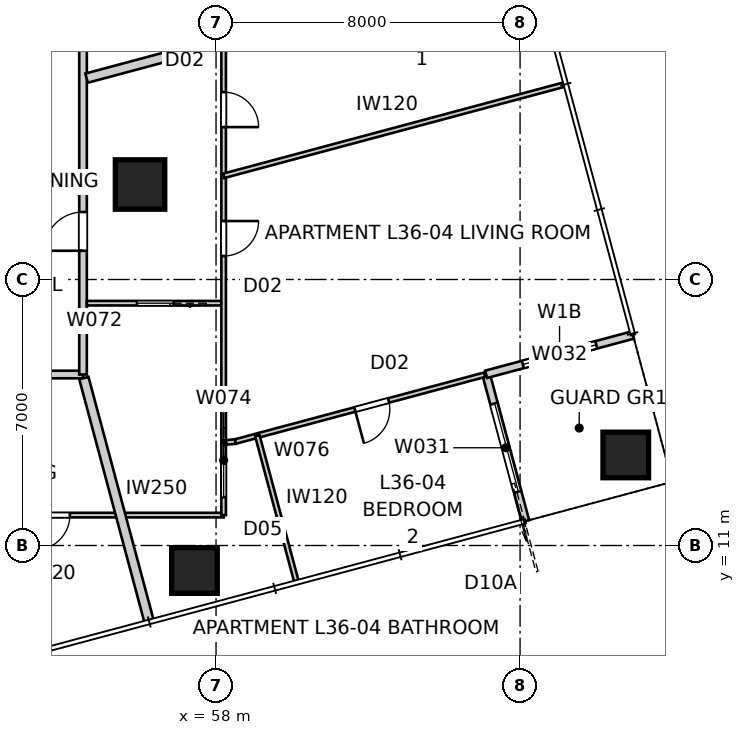
"""IFC4 building model, lengths in metres.
Left out: names, types, materials, properties, quantities, classifications, styles, units other than length and angle.
Written with IfcOpenShell. Run it as: python <this file> out.ifc"""

import sys

from ifc_helpers import new_model, si_unit, direction, frame, frame_2d, origin, origin_2d, place, context, subcontext, project, spatial, rectangle, extrude, element, fill, save


model = new_model("IFC4")
c1 = context("Model", 3, precision=1e-05, world=origin(), true_north=direction((0.0, 1.0)))
c2 = subcontext(c1, "Body", "Model", "MODEL_VIEW")
j1 = project(units=[si_unit("LENGTHUNIT", "METRE"), si_unit("PLANEANGLEUNIT", "RADIAN")], contexts=[c1])
p1 = place(None, origin())
s1 = spatial("IfcSite", under=j1, at=p1, CompositionType="ELEMENT")
p2 = place(p1, origin())
s2 = spatial("IfcBuilding", under=s1, at=p2, CompositionType="ELEMENT")
p3 = place(p2, frame((0.0, 0.0, 132.0)))
s3 = spatial("IfcBuildingStorey", under=s2, at=p3, CompositionType="ELEMENT", Elevation=132.0)
for number, where, z_axis, x_axis in (
    (1, (57.432, 10.342, 0.0), (0.0, 0.0, 1.0), (1.0, 0.0, 0.0)),
    (2, (68.781, 13.383, 0.0), (0.0, 0.0, 1.0), (1.0, 0.0, 0.0)),
):
    element("IfcColumn", number, at=place(p3, frame(where, z_axis=z_axis, x_axis=x_axis)), inside=s3, PredefinedType="COLUMN", context=c2, shape_type="SweptSolid", body=[
        extrude(rectangle(XDim=1.2, YDim=1.2, at=origin_2d()), origin(), (0.0, 0.0, 1.0), 3.4),
    ])
p4 = place(p3, frame((56.0, 20.5, 0.0), z_axis=(0.0, 0.0, 1.0), x_axis=(1.0, 0.0, 0.0)))
e3 = element("IfcColumn", 3, at=p4, inside=s3, PredefinedType="COLUMN", context=c2, shape_type="SweptSolid", body=[
    extrude(rectangle(XDim=1.3, YDim=1.3, at=origin_2d()), origin(), (0.0, 0.0, 1.0), 3.4),
])
p5 = place(p3, frame((66.143, 11.641, 0.0), z_axis=(0.0, 0.0, 1.0), x_axis=(-0.258843877716, 0.965919172068, 0.0)))
e4 = element("IfcWall", 4, at=p5, inside=s3, PredefinedType="SOLIDWALL", context=c2, shape_type="SweptSolid", body=[
    extrude(rectangle(XDim=4.0, YDim=0.2, at=frame_2d((2.0, 0.0))), origin(), (0.0, 0.0, 1.0), 3.25),
])
p6 = place(p5, frame((0.8, 0.0, 0.0)))
e5 = element("IfcOpeningElement", 5, at=p6, cuts=e4, PredefinedType="OPENING", context=c2, shape_type="SweptSolid", body=[
    extrude(rectangle(XDim=2.4, YDim=2.1, at=frame_2d((1.2, 1.05))), frame((0.0, 0.11, 0.0), z_axis=(0.0, -1.0, 0.0), x_axis=(1.0, 0.0, 0.0)), (0.0, 0.0, 1.0), 0.22),
])
p7 = place(p3, frame((65.107, 15.504, 0.0), z_axis=(0.0, 0.0, 1.0), x_axis=(0.965934430412, 0.258786931944, 0.0)))
e6 = element("IfcWall", 6, at=p7, inside=s3, PredefinedType="SOLIDWALL", context=c2, shape_type="SweptSolid", body=[
    extrude(rectangle(XDim=4.0, YDim=0.2, at=frame_2d((2.0, 0.0))), origin(), (0.0, 0.0, 1.0), 3.25),
])
p8 = place(p7, frame((1.0, 0.0, 0.45)))
e7 = element("IfcOpeningElement", 7, at=p8, cuts=e6, PredefinedType="OPENING", context=c2, shape_type="SweptSolid", body=[
    extrude(rectangle(XDim=2.0, YDim=1.8, at=frame_2d((1.0, 0.9))), frame((0.0, 0.11, 0.0), z_axis=(0.0, -1.0, 0.0), x_axis=(1.0, 0.0, 0.0)), (0.0, 0.0, 1.0), 0.22),
])
p9 = place(p3, frame((25.5, 15.5, 0.0), z_axis=(0.0, 0.0, 1.0), x_axis=(1.0, 0.0, 0.0)))
e8 = element("IfcWall", 8, at=p9, inside=s3, PredefinedType="PARTITIONING", context=c2, shape_type="SweptSolid", body=[
    extrude(rectangle(XDim=29.0, YDim=0.2, at=frame_2d((14.5, 0.0))), origin(), (0.0, 0.0, 1.0), 3.25),
])
p10 = place(p9, frame((24.996, 0.0, 0.0)))
e9 = element("IfcOpeningElement", 9, at=p10, cuts=e8, PredefinedType="OPENING", context=c2, shape_type="SweptSolid", body=[
    extrude(rectangle(XDim=1.02, YDim=2.1, at=frame_2d((0.51, 1.05))), frame((0.0, 0.11, 0.0), z_axis=(0.0, -1.0, 0.0), x_axis=(1.0, 0.0, 0.0)), (0.0, 0.0, 1.0), 0.22),
])
p11 = place(p9, frame((1.761, 0.0, 0.0)))
e10 = element("IfcOpeningElement", 10, at=p11, cuts=e8, PredefinedType="OPENING", context=c2, shape_type="SweptSolid", body=[
    extrude(rectangle(XDim=1.02, YDim=2.34, at=frame_2d((0.51, 1.17))), frame((0.0, 0.11, 0.0), z_axis=(0.0, -1.0, 0.0), x_axis=(1.0, 0.0, 0.0)), (0.0, 0.0, 1.0), 0.22),
])
p12 = place(p3, frame((54.5, 15.5, 0.0), z_axis=(0.0, 0.0, 1.0), x_axis=(0.0, 1.0, 0.0)))
e11 = element("IfcWall", 11, at=p12, inside=s3, PredefinedType="PARTITIONING", context=c2, shape_type="SweptSolid", body=[
    extrude(rectangle(XDim=28.2, YDim=0.2, at=frame_2d((14.1, 0.0))), origin(), (0.0, 0.0, 1.0), 3.25),
])
p13 = place(p12, frame((21.527, 0.0, 0.0)))
e12 = element("IfcOpeningElement", 12, at=p13, cuts=e11, PredefinedType="OPENING", context=c2, shape_type="SweptSolid", body=[
    extrude(rectangle(XDim=1.02, YDim=2.34, at=frame_2d((0.51, 1.17))), frame((0.0, 0.11, 0.0), z_axis=(0.0, -1.0, 0.0), x_axis=(1.0, 0.0, 0.0)), (0.0, 0.0, 1.0), 0.22),
])
p14 = place(p12, frame((3.256, 0.0, 0.0)))
e13 = element("IfcOpeningElement", 13, at=p14, cuts=e11, PredefinedType="OPENING", context=c2, shape_type="SweptSolid", body=[
    extrude(rectangle(XDim=1.02, YDim=2.1, at=frame_2d((0.51, 1.05))), frame((0.0, 0.11, 0.0), z_axis=(0.0, -1.0, 0.0), x_axis=(1.0, 0.0, 0.0)), (0.0, 0.0, 1.0), 0.22),
])
p15 = place(p12, frame((26.127, 0.0, 0.0)))
e14 = element("IfcOpeningElement", 14, at=p15, cuts=e11, PredefinedType="OPENING", context=c2, shape_type="SweptSolid", body=[
    extrude(rectangle(XDim=1.02, YDim=2.34, at=frame_2d((0.51, 1.17))), frame((0.0, 0.11, 0.0), z_axis=(0.0, -1.0, 0.0), x_axis=(1.0, 0.0, 0.0)), (0.0, 0.0, 1.0), 0.22),
])
p16 = place(p3, frame((56.242, 8.988, 0.0), z_axis=(0.0, 0.0, 1.0), x_axis=(-0.25880587229, 0.965929355837, 0.0)))
e15 = element("IfcWall", 15, at=p16, inside=s3, PredefinedType="PARTITIONING", context=c2, shape_type="SweptSolid", body=[
    extrude(rectangle(XDim=6.645, YDim=0.25, at=frame_2d((3.322, 0.0))), origin(), (0.0, 0.0, 1.0), 3.25),
])
p17 = place(p3, frame((66.318, 26.44, 0.0), z_axis=(0.0, 0.0, 1.0), x_axis=(-0.965924438766, -0.258824223352, 0.0)))
e16 = element("IfcWall", 16, at=p17, inside=s3, PredefinedType="PARTITIONING", context=c2, shape_type="SweptSolid", body=[
    extrude(rectangle(XDim=12.138, YDim=0.25, at=frame_2d((6.069, 0.0))), origin(), (0.0, 0.0, 1.0), 3.25),
])
p18 = place(p3, frame((58.2, 11.8, 0.0), z_axis=(0.0, 0.0, 1.0), x_axis=(-1.0, 0.0, 0.0)))
e17 = element("IfcWall", 17, at=p18, inside=s3, PredefinedType="PARTITIONING", context=c2, shape_type="SweptSolid", body=[
    extrude(rectangle(XDim=20.9, YDim=0.12, at=frame_2d((10.45, 0.0))), origin(), (0.0, 0.0, 1.0), 3.25),
])
p19 = place(p18, frame((7.807, 0.0, 0.0)))
e18 = element("IfcOpeningElement", 18, at=p19, cuts=e17, PredefinedType="OPENING", context=c2, shape_type="SweptSolid", body=[
    extrude(rectangle(XDim=0.92, YDim=2.34, at=frame_2d((0.46, 1.17))), frame((0.0, 0.07, 0.0), z_axis=(0.0, -1.0, 0.0), x_axis=(1.0, 0.0, 0.0)), (0.0, 0.0, 1.0), 0.14),
])
p20 = place(p18, frame((4.046, 0.0, 0.0)))
e19 = element("IfcOpeningElement", 19, at=p20, cuts=e17, PredefinedType="OPENING", context=c2, shape_type="SweptSolid", body=[
    extrude(rectangle(XDim=0.92, YDim=2.34, at=frame_2d((0.46, 1.17))), frame((0.0, 0.07, 0.0), z_axis=(0.0, -1.0, 0.0), x_axis=(1.0, 0.0, 0.0)), (0.0, 0.0, 1.0), 0.14),
])
p21 = place(p18, frame((15.602, 0.0, 0.0)))
e20 = element("IfcOpeningElement", 20, at=p21, cuts=e17, PredefinedType="OPENING", context=c2, shape_type="SweptSolid", body=[
    extrude(rectangle(XDim=0.96, YDim=2.1, at=frame_2d((0.48, 1.05))), frame((0.0, 0.07, 0.0), z_axis=(0.0, -1.0, 0.0), x_axis=(1.0, 0.0, 0.0)), (0.0, 0.0, 1.0), 0.14),
])
p22 = place(p3, frame((58.2, 17.377, 0.0), z_axis=(0.0, 0.0, 1.0), x_axis=(-1.0, 0.0, 0.0)))
e21 = element("IfcWall", 21, at=p22, inside=s3, PredefinedType="PARTITIONING", context=c2, shape_type="SweptSolid", body=[
    extrude(rectangle(XDim=3.6, YDim=0.12, at=frame_2d((1.8, 0.0))), origin(), (0.0, 0.0, 1.0), 3.25),
])
p23 = place(p22, frame((1.32, 0.0, 0.0)))
e22 = element("IfcOpeningElement", 22, at=p23, cuts=e21, PredefinedType="OPENING", context=c2, shape_type="SweptSolid", body=[
    extrude(rectangle(XDim=0.96, YDim=2.1, at=frame_2d((0.48, 1.05))), frame((0.0, 0.07, 0.0), z_axis=(0.0, -1.0, 0.0), x_axis=(1.0, 0.0, 0.0)), (0.0, 0.0, 1.0), 0.14),
])
p24 = place(p3, frame((58.2, 48.2, 0.0), z_axis=(0.0, 0.0, 1.0), x_axis=(0.0, -1.0, 0.0)))
e23 = element("IfcWall", 23, at=p24, inside=s3, PredefinedType="PARTITIONING", context=c2, shape_type="SweptSolid", body=[
    extrude(rectangle(XDim=33.512, YDim=0.12, at=frame_2d((16.756, 0.0))), origin(), (0.0, 0.0, 1.0), 2.637),
])
p25 = place(p24, frame((11.441, 0.0, 0.0)))
e24 = element("IfcOpeningElement", 24, at=p25, cuts=e23, PredefinedType="OPENING", context=c2, shape_type="SweptSolid", body=[
    extrude(rectangle(XDim=0.92, YDim=2.34, at=frame_2d((0.46, 1.17))), frame((0.0, 0.07, 0.0), z_axis=(0.0, -1.0, 0.0), x_axis=(1.0, 0.0, 0.0)), (0.0, 0.0, 1.0), 0.14),
])
p26 = place(p24, frame((7.583, 0.0, 0.0)))
e25 = element("IfcOpeningElement", 25, at=p26, cuts=e23, PredefinedType="OPENING", context=c2, shape_type="SweptSolid", body=[
    extrude(rectangle(XDim=0.92, YDim=2.34, at=frame_2d((0.46, 1.17))), frame((0.0, 0.07, 0.0), z_axis=(0.0, -1.0, 0.0), x_axis=(1.0, 0.0, 0.0)), (0.0, 0.0, 1.0), 0.14),
])
p27 = place(p24, frame((25.269, 0.0, 0.0)))
e26 = element("IfcOpeningElement", 26, at=p27, cuts=e23, PredefinedType="OPENING", context=c2, shape_type="SweptSolid", body=[
    extrude(rectangle(XDim=0.92, YDim=2.34, at=frame_2d((0.46, 1.17))), frame((0.0, 0.07, 0.0), z_axis=(0.0, -1.0, 0.0), x_axis=(1.0, 0.0, 0.0)), (0.0, 0.0, 1.0), 0.14),
])
p28 = place(p24, frame((28.662, 0.0, 0.0)))
e27 = element("IfcOpeningElement", 27, at=p28, cuts=e23, PredefinedType="OPENING", context=c2, shape_type="SweptSolid", body=[
    extrude(rectangle(XDim=0.92, YDim=2.34, at=frame_2d((0.46, 1.17))), frame((0.0, 0.07, 0.0), z_axis=(0.0, -1.0, 0.0), x_axis=(1.0, 0.0, 0.0)), (0.0, 0.0, 1.0), 0.14),
])
p29 = place(p24, frame((4.15, 0.0, 0.0)))
e28 = element("IfcOpeningElement", 28, at=p29, cuts=e23, PredefinedType="OPENING", context=c2, shape_type="SweptSolid", body=[
    extrude(rectangle(XDim=0.92, YDim=2.34, at=frame_2d((0.46, 1.17))), frame((0.0, 0.07, 0.0), z_axis=(0.0, -1.0, 0.0), x_axis=(1.0, 0.0, 0.0)), (0.0, 0.0, 1.0), 0.14),
])
p30 = place(p3, frame((58.2, 20.728, 0.0), z_axis=(0.0, 0.0, 1.0), x_axis=(0.965925974596, 0.258818491613, 0.0)))
e29 = element("IfcWall", 29, at=p30, inside=s3, PredefinedType="PARTITIONING", context=c2, shape_type="SweptSolid", body=[
    extrude(rectangle(XDim=9.28, YDim=0.12, at=frame_2d((4.64, 0.0))), origin(), (0.0, 0.0, 1.0), 2.721),
])
p31 = place(p3, frame((65.069, 15.494, 0.0), z_axis=(0.0, 0.0, 1.0), x_axis=(-0.965922865286, -0.258830095464, 0.0)))
e30 = element("IfcWall", 30, at=p31, inside=s3, PredefinedType="PARTITIONING", context=c2, shape_type="SweptSolid", body=[
    extrude(rectangle(XDim=6.793, YDim=0.12, at=frame_2d((3.396, 0.0))), origin(), (0.0, 0.0, 1.0), 3.25),
])
p32 = place(p31, frame((2.617, 0.0, 0.0)))
e31 = element("IfcOpeningElement", 31, at=p32, cuts=e30, PredefinedType="OPENING", context=c2, shape_type="SweptSolid", body=[
    extrude(rectangle(XDim=0.92, YDim=2.34, at=frame_2d((0.46, 1.17))), frame((0.0, 0.07, 0.0), z_axis=(0.0, -1.0, 0.0), x_axis=(1.0, 0.0, 0.0)), (0.0, 0.0, 1.0), 0.14),
])
p33 = place(p3, frame((60.111, 10.066, 0.0), z_axis=(0.0, 0.0, 1.0), x_axis=(-0.258863452657, 0.965913926227, 0.0)))
e32 = element("IfcWall", 32, at=p33, inside=s3, PredefinedType="PARTITIONING", context=c2, shape_type="SweptSolid", body=[
    extrude(rectangle(XDim=3.96, YDim=0.12, at=frame_2d((1.98, 0.0))), origin(), (0.0, 0.0, 1.0), 3.25),
])
p34 = place(p3, frame((58.2, 14.688, 0.0), z_axis=(0.0, 0.0, 1.0), x_axis=(0.0, -1.0, 0.0)))
e33 = element("IfcWall", 33, at=p34, inside=s3, PredefinedType="PARTITIONING", context=c2, shape_type="SweptSolid", body=[
    extrude(rectangle(XDim=2.887, YDim=0.12, at=frame_2d((1.444, 0.0))), origin(), (0.0, 0.0, 1.0), 3.25),
])
p35 = place(p34, frame((1.455, 0.0, 0.0)))
e34 = element("IfcOpeningElement", 34, at=p35, cuts=e33, PredefinedType="OPENING", context=c2, shape_type="SweptSolid", body=[
    extrude(rectangle(XDim=0.96, YDim=2.1, at=frame_2d((0.48, 1.05))), frame((0.0, 0.07, 0.0), z_axis=(0.0, -1.0, 0.0), x_axis=(1.0, 0.0, 0.0)), (0.0, 0.0, 1.0), 0.14),
])
p36 = place(p3, frame((58.507, 13.736, 0.0), z_axis=(0.0, 0.0, 1.0), x_axis=(-0.995169554704, -0.09817106188, 0.0)))
e35 = element("IfcWall", 35, at=p36, inside=s3, PredefinedType="PARTITIONING", context=c2, shape_type="SweptSolid", body=[
    extrude(rectangle(XDim=0.308, YDim=0.12, at=frame_2d((0.154, 0.0))), origin(), (0.0, 0.0, 1.0), 3.25),
])
p37 = place(p6, origin())
e36 = element("IfcDoor", 36, at=p37, inside=s3, OperationType="SLIDING_TO_LEFT", PredefinedType="DOOR", context=c2, shape_type="SweptSolid", body=[
    extrude(rectangle(XDim=2.4, YDim=2.1, at=frame_2d((1.2, 1.05))), frame((0.0, 0.025, 0.0), z_axis=(0.0, -1.0, 0.0), x_axis=(1.0, 0.0, 0.0)), (0.0, 0.0, 1.0), 0.05),
])
fill(e5, e36)
p38 = place(p8, origin())
e37 = element("IfcWindow", 37, at=p38, inside=s3, PartitioningType="SINGLE_PANEL", PredefinedType="WINDOW", context=c2, shape_type="SweptSolid", body=[
    extrude(rectangle(XDim=2.0, YDim=1.8, at=frame_2d((1.0, 0.9))), frame((0.0, 0.03, 0.0), z_axis=(0.0, -1.0, 0.0), x_axis=(1.0, 0.0, 0.0)), (0.0, 0.0, 1.0), 0.06),
])
fill(e7, e37)
p39 = place(p14, origin())
e38 = element("IfcDoor", 38, at=p39, inside=s3, OperationType="SINGLE_SWING_LEFT", PredefinedType="DOOR", context=c2, shape_type="SweptSolid", body=[
    extrude(rectangle(XDim=1.02, YDim=2.1, at=frame_2d((0.51, 1.05))), frame((0.0, 0.025, 0.0), z_axis=(0.0, -1.0, 0.0), x_axis=(1.0, 0.0, 0.0)), (0.0, 0.0, 1.0), 0.05),
])
fill(e13, e38)
p40 = place(p20, origin())
e39 = element("IfcDoor", 39, at=p40, inside=s3, OperationType="SINGLE_SWING_RIGHT", PredefinedType="DOOR", context=c2, shape_type="SweptSolid", body=[
    extrude(rectangle(XDim=0.92, YDim=2.34, at=frame_2d((0.46, 1.17))), frame((0.0, 0.025, 0.0), z_axis=(0.0, -1.0, 0.0), x_axis=(1.0, 0.0, 0.0)), (0.0, 0.0, 1.0), 0.05),
])
fill(e19, e39)
p41 = place(p23, origin())
e40 = element("IfcDoor", 40, at=p41, inside=s3, OperationType="SLIDING_TO_LEFT", PredefinedType="DOOR", context=c2, shape_type="SweptSolid", body=[
    extrude(rectangle(XDim=0.96, YDim=2.1, at=frame_2d((0.48, 1.05))), frame((0.0, 0.025, 0.0), z_axis=(0.0, -1.0, 0.0), x_axis=(1.0, 0.0, 0.0)), (0.0, 0.0, 1.0), 0.05),
])
fill(e22, e40)
p42 = place(p27, origin())
e41 = element("IfcDoor", 41, at=p42, inside=s3, OperationType="SINGLE_SWING_RIGHT", PredefinedType="DOOR", context=c2, shape_type="SweptSolid", body=[
    extrude(rectangle(XDim=0.92, YDim=2.34, at=frame_2d((0.46, 1.17))), frame((0.0, 0.025, 0.0), z_axis=(0.0, -1.0, 0.0), x_axis=(1.0, 0.0, 0.0)), (0.0, 0.0, 1.0), 0.05),
])
fill(e26, e41)
p43 = place(p28, origin())
e42 = element("IfcDoor", 42, at=p43, inside=s3, OperationType="SINGLE_SWING_LEFT", PredefinedType="DOOR", context=c2, shape_type="SweptSolid", body=[
    extrude(rectangle(XDim=0.92, YDim=2.34, at=frame_2d((0.46, 1.17))), frame((0.0, 0.025, 0.0), z_axis=(0.0, -1.0, 0.0), x_axis=(1.0, 0.0, 0.0)), (0.0, 0.0, 1.0), 0.05),
])
fill(e27, e42)
p44 = place(p35, origin())
e43 = element("IfcDoor", 43, at=p44, inside=s3, OperationType="SLIDING_TO_LEFT", PredefinedType="DOOR", context=c2, shape_type="SweptSolid", body=[
    extrude(rectangle(XDim=0.96, YDim=2.1, at=frame_2d((0.48, 1.05))), frame((0.0, 0.025, 0.0), z_axis=(0.0, -1.0, 0.0), x_axis=(1.0, 0.0, 0.0)), (0.0, 0.0, 1.0), 0.05),
])
fill(e34, e43)
p45 = place(p32, origin())
e44 = element("IfcDoor", 44, at=p45, inside=s3, OperationType="SINGLE_SWING_RIGHT", PredefinedType="DOOR", context=c2, shape_type="SweptSolid", body=[
    extrude(rectangle(XDim=0.92, YDim=2.34, at=frame_2d((0.46, 1.17))), frame((0.0, 0.025, 0.0), z_axis=(0.0, -1.0, 0.0), x_axis=(1.0, 0.0, 0.0)), (0.0, 0.0, 1.0), 0.05),
])
fill(e31, e44)
save(model, sys.argv[1])
